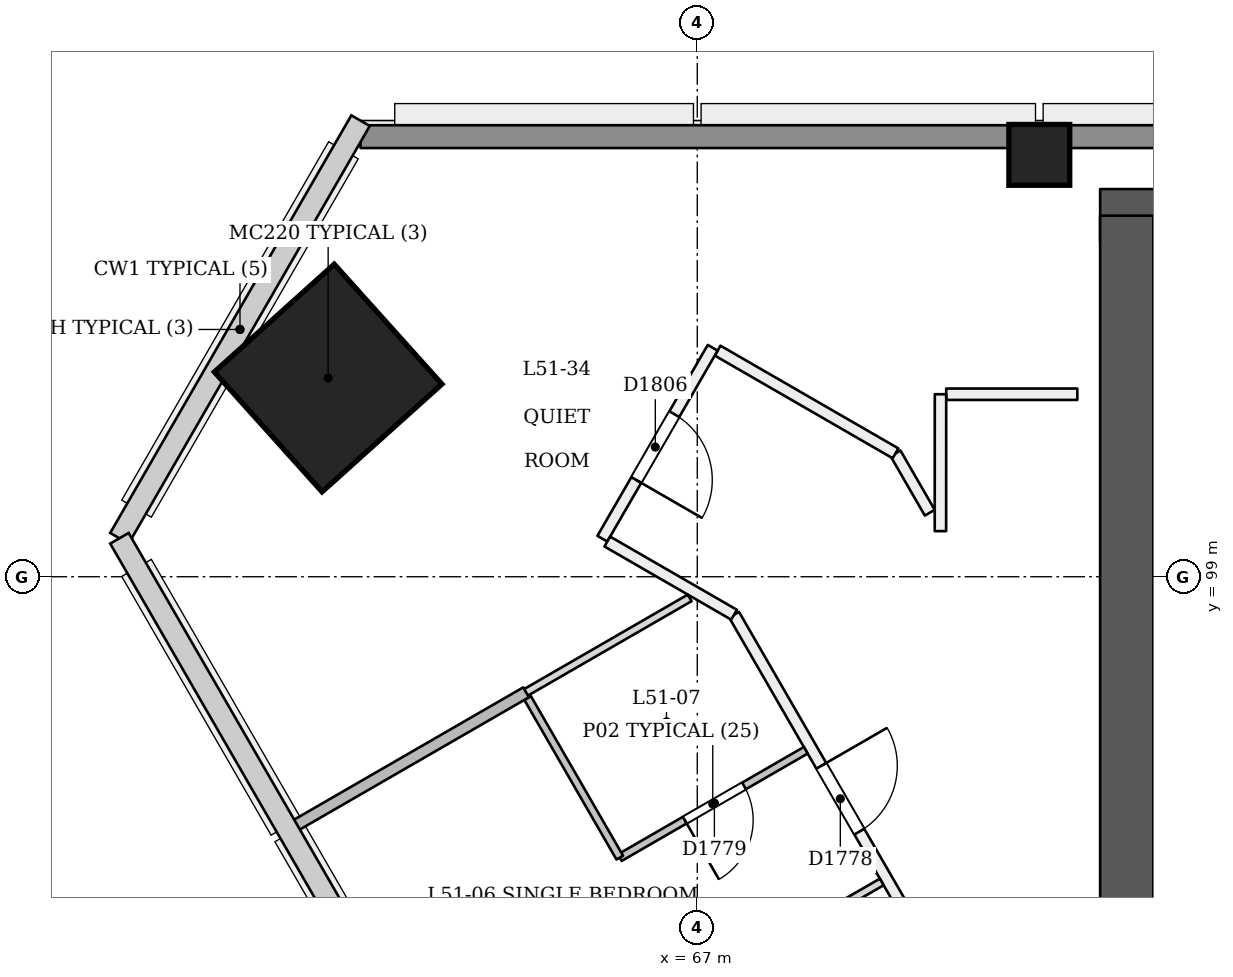
"""IFC4 building model, lengths in metres.
Left out: names, types, materials, properties, quantities, classifications, styles, units other than length and angle.
Written with IfcOpenShell. Run it as: python <this file> out.ifc"""

import sys

from ifc_helpers import new_model, si_unit, direction, frame, frame_2d, origin, origin_2d, place, context, subcontext, project, spatial, rectangle, extrude, element, fill, save


model = new_model("IFC4")
c1 = context("Model", 3, precision=1e-05, world=origin(), true_north=direction((0.0, 1.0)))
c2 = subcontext(c1, "Body", "Model", "MODEL_VIEW")
j1 = project(units=[si_unit("LENGTHUNIT", "METRE"), si_unit("PLANEANGLEUNIT", "RADIAN")], contexts=[c1])
p1 = place(None, origin())
s1 = spatial("IfcSite", under=j1, at=p1, CompositionType="ELEMENT")
p2 = place(p1, origin())
s2 = spatial("IfcBuilding", under=s1, at=p2, CompositionType="ELEMENT")
p3 = place(p2, frame((0.0, 0.0, 198.0)))
s3 = spatial("IfcBuildingStorey", under=s2, at=p3, CompositionType="ELEMENT", Elevation=198.0)
p4 = place(p3, frame((97.35, 103.75, 0.0), z_axis=(0.0, 0.0, 1.0), x_axis=(-1.0, 0.0, 0.0)))
e1 = element("IfcWall", 1, at=p4, inside=s3, PredefinedType="SHEAR", context=c2, shape_type="SweptSolid", body=[
    extrude(rectangle(XDim=25.05, YDim=0.7, at=frame_2d((12.525, 0.0))), origin(), (0.0, 0.0, 1.0), 3.6),
])
p5 = place(p3, frame((72.65, 103.75, 0.0), z_axis=(0.0, 0.0, 1.0), x_axis=(0.0, -1.0, 0.0)))
e2 = element("IfcWall", 2, at=p5, inside=s3, PredefinedType="SHEAR", context=c2, shape_type="SweptSolid", body=[
    extrude(rectangle(XDim=11.05, YDim=0.7, at=frame_2d((5.525, 0.0))), origin(), (0.0, 0.0, 1.0), 3.6),
])
p6 = place(p3, frame((62.11, 101.603, 0.0), z_axis=(0.028401814599, 0.009218727412, 0.999554076572), x_axis=(-0.865125961523, 0.50115732909, 0.019960014995)))
e3 = element("IfcColumn", 3, at=p6, inside=s3, PredefinedType="COLUMN", context=c2, shape_type="SweptSolid", body=[
    extrude(rectangle(XDim=2.12, YDim=2.12, at=origin_2d()), origin(), (0.0, 0.0, 1.0), 3.602),
])
p7 = place(p3, frame((71.5, 104.55, 0.0), z_axis=(0.0, 0.0, 1.0), x_axis=(1.0, 0.0, 0.0)))
e4 = element("IfcColumn", 4, at=p7, inside=s3, PredefinedType="COLUMN", context=c2, shape_type="SweptSolid", body=[
    extrude(rectangle(XDim=0.8, YDim=0.8, at=origin_2d()), origin(), (0.0, 0.0, 1.0), 3.6),
])
p8 = place(p3, frame((67.484, 98.5, 0.0), z_axis=(0.0, 0.0, 1.0), x_axis=(0.499972772639, -0.866041122938, 0.0)))
e5 = element("IfcWall", 5, at=p8, inside=s3, PredefinedType="PARTITIONING", context=c2, shape_type="SweptSolid", body=[
    extrude(rectangle(XDim=5.431, YDim=0.15, at=frame_2d((2.716, 0.0))), origin(), (0.0, 0.0, 1.0), 3.15),
])
p9 = place(p8, frame((2.295, 0.0, 0.0)))
e6 = element("IfcOpeningElement", 6, at=p9, cuts=e5, PredefinedType="OPENING", context=c2, shape_type="SweptSolid", body=[
    extrude(rectangle(XDim=1.0, YDim=2.1, at=frame_2d((0.5, 1.05))), frame((0.0, 0.085, 0.0), z_axis=(0.0, -1.0, 0.0), x_axis=(1.0, 0.0, 0.0)), (0.0, 0.0, 1.0), 0.171),
])
p10 = place(p3, frame((72.0, 101.401, 0.0), z_axis=(0.0, 0.0, 1.0), x_axis=(-1.0, 0.0, 0.0)))
e7 = element("IfcWall", 7, at=p10, inside=s3, PredefinedType="PARTITIONING", context=c2, shape_type="SweptSolid", body=[
    extrude(rectangle(XDim=1.725, YDim=0.15, at=frame_2d((0.863, 0.0))), origin(), (0.0, 0.0, 1.0), 3.15),
])
p11 = place(p3, frame((70.2, 101.401, 0.0), z_axis=(0.0, 0.0, 1.0), x_axis=(-0.000542225757, -0.999999852996, 0.0)))
e8 = element("IfcWall", 8, at=p11, inside=s3, PredefinedType="PARTITIONING", context=c2, shape_type="SweptSolid", body=[
    extrude(rectangle(XDim=1.801, YDim=0.15, at=frame_2d((0.9, 0.0))), origin(), (0.0, 0.0, 1.0), 3.15),
])
p12 = place(p3, frame((70.059, 99.842, 0.0), z_axis=(0.0, 0.0, 1.0), x_axis=(-0.499777110788, 0.866154050694, 0.0)))
e9 = element("IfcWall", 9, at=p12, inside=s3, PredefinedType="PARTITIONING", context=c2, shape_type="SweptSolid", body=[
    extrude(rectangle(XDim=0.902, YDim=0.15, at=frame_2d((0.451, 0.0))), origin(), (0.0, 0.0, 1.0), 3.15),
])
p13 = place(p3, frame((69.608, 100.624, 0.0), z_axis=(0.0, 0.0, 1.0), x_axis=(-0.866027634565, 0.499996136155, 0.0)))
e10 = element("IfcWall", 10, at=p13, inside=s3, PredefinedType="PARTITIONING", context=c2, shape_type="SweptSolid", body=[
    extrude(rectangle(XDim=2.703, YDim=0.15, at=frame_2d((1.351, 0.0))), origin(), (0.0, 0.0, 1.0), 3.15),
])
p14 = place(p3, frame((67.203, 102.012, 0.0), z_axis=(0.0, 0.0, 1.0), x_axis=(-0.500229925737, -0.865892615396, 0.0)))
e11 = element("IfcWall", 11, at=p14, inside=s3, PredefinedType="PARTITIONING", context=c2, shape_type="SweptSolid", body=[
    extrude(rectangle(XDim=2.901, YDim=0.15, at=frame_2d((1.451, 0.0))), origin(), (0.0, 0.0, 1.0), 3.15),
])
p15 = place(p14, frame((1.009, 0.0, 0.0)))
e12 = element("IfcOpeningElement", 12, at=p15, cuts=e11, PredefinedType="OPENING", context=c2, shape_type="SweptSolid", body=[
    extrude(rectangle(XDim=1.0, YDim=2.1, at=frame_2d((0.5, 1.05))), frame((0.0, 0.085, 0.0), z_axis=(0.0, -1.0, 0.0), x_axis=(1.0, 0.0, 0.0)), (0.0, 0.0, 1.0), 0.171),
])
p16 = place(p3, frame((65.816, 99.463, 0.0), z_axis=(0.0, 0.0, 1.0), x_axis=(0.86605048973, -0.49995654735, 0.0)))
e13 = element("IfcWall", 13, at=p16, inside=s3, PredefinedType="PARTITIONING", context=c2, shape_type="SweptSolid", body=[
    extrude(rectangle(XDim=1.926, YDim=0.15, at=frame_2d((0.963, 0.0))), origin(), (0.0, 0.0, 1.0), 3.15),
])
p17 = place(p3, frame((68.427, 96.717, 0.0), z_axis=(0.0, 0.0, 1.0), x_axis=(-0.866048868473, -0.499959355765, 0.0)))
e14 = element("IfcWall", 14, at=p17, inside=s3, PredefinedType="PARTITIONING", context=c2, shape_type="SweptSolid", body=[
    extrude(rectangle(XDim=2.825, YDim=0.1, at=frame_2d((1.413, 0.0))), origin(), (0.0, 0.0, 1.0), 3.15),
])
p18 = place(p17, frame((0.938, 0.0, 0.0)))
e15 = element("IfcOpeningElement", 15, at=p18, cuts=e14, PredefinedType="OPENING", context=c2, shape_type="SweptSolid", body=[
    extrude(rectangle(XDim=0.9, YDim=2.1, at=frame_2d((0.45, 1.05))), frame((0.0, 0.061, 0.0), z_axis=(0.0, -1.0, 0.0), x_axis=(1.0, 0.0, 0.0)), (0.0, 0.0, 1.0), 0.121),
])
p19 = place(p3, frame((65.981, 95.304, 0.0), z_axis=(0.0, 0.0, 1.0), x_axis=(-0.500047793048, 0.865997808697, 0.0)))
e16 = element("IfcWall", 16, at=p19, inside=s3, PredefinedType="PARTITIONING", context=c2, shape_type="SweptSolid", body=[
    extrude(rectangle(XDim=2.425, YDim=0.1, at=frame_2d((1.212, 0.0))), origin(), (0.0, 0.0, 1.0), 3.15),
])
p20 = place(p3, frame((66.894, 93.522, 0.0), z_axis=(0.0, 0.0, 1.0), x_axis=(0.86601045545, 0.500025890382, 0.0)))
e17 = element("IfcWall", 17, at=p20, inside=s3, PredefinedType="PARTITIONING", context=c2, shape_type="SweptSolid", body=[
    extrude(rectangle(XDim=2.925, YDim=0.1, at=frame_2d((1.462, 0.0))), origin(), (0.0, 0.0, 1.0), 3.15),
])
p21 = place(p3, frame((64.748, 97.479, 0.0), z_axis=(0.0, 0.0, 1.0), x_axis=(-0.866006432019, -0.500032858622, 0.0)))
e18 = element("IfcWall", 18, at=p21, inside=s3, PredefinedType="PARTITIONING", context=c2, shape_type="SweptSolid", body=[
    extrude(rectangle(XDim=3.54, YDim=0.15, at=frame_2d((1.77, 0.0))), origin(), (0.0, 0.0, 1.0), 2.65),
])
p22 = place(p3, frame((66.9, 98.722, 0.0), z_axis=(0.0, 0.0, 1.0), x_axis=(-0.866014894461, -0.50001820224, 0.0)))
e19 = element("IfcWall", 19, at=p22, inside=s3, PredefinedType="PARTITIONING", context=c2, shape_type="SweptSolid", body=[
    extrude(rectangle(XDim=2.525, YDim=0.1, at=frame_2d((1.262, 0.0))), origin(), (0.0, 0.0, 1.0), 3.15),
])
p23 = place(p3, frame((62.57, 104.79, 0.0), z_axis=(0.0, 0.0, 1.0), x_axis=(1.0, 0.0, 0.0)))
e20 = element("IfcWall", 20, at=p23, inside=s3, PredefinedType="SOLIDWALL", context=c2, shape_type="SweptSolid", body=[
    extrude(rectangle(XDim=44.86, YDim=0.3, at=frame_2d((22.43, 0.0))), origin(), (0.0, 0.0, 1.0), 2.65),
])
p24 = place(p9, origin())
e21 = element("IfcDoor", 21, at=p24, inside=s3, OperationType="SINGLE_SWING_LEFT", PredefinedType="NOTDEFINED", context=c2, shape_type="SweptSolid", body=[
    extrude(rectangle(XDim=1.0, YDim=2.1, at=frame_2d((0.5, 1.05))), frame((0.0, 0.025, 0.0), z_axis=(0.0, -1.0, 0.0), x_axis=(1.0, 0.0, 0.0)), (0.0, 0.0, 1.0), 0.05),
])
fill(e6, e21)
p25 = place(p18, origin())
e22 = element("IfcDoor", 22, at=p25, inside=s3, OperationType="SINGLE_SWING_RIGHT", PredefinedType="NOTDEFINED", context=c2, shape_type="SweptSolid", body=[
    extrude(rectangle(XDim=0.9, YDim=2.1, at=frame_2d((0.45, 1.05))), frame((0.0, 0.025, 0.0), z_axis=(0.0, -1.0, 0.0), x_axis=(1.0, 0.0, 0.0)), (0.0, 0.0, 1.0), 0.05),
])
fill(e15, e22)
p26 = place(p15, origin())
e23 = element("IfcDoor", 23, at=p26, inside=s3, OperationType="SINGLE_SWING_RIGHT", PredefinedType="NOTDEFINED", context=c2, shape_type="SweptSolid", body=[
    extrude(rectangle(XDim=1.0, YDim=2.1, at=frame_2d((0.5, 1.05))), frame((0.0, 0.025, 0.0), z_axis=(0.0, -1.0, 0.0), x_axis=(1.0, 0.0, 0.0)), (0.0, 0.0, 1.0), 0.05),
])
fill(e12, e23)
save(model, sys.argv[1])
